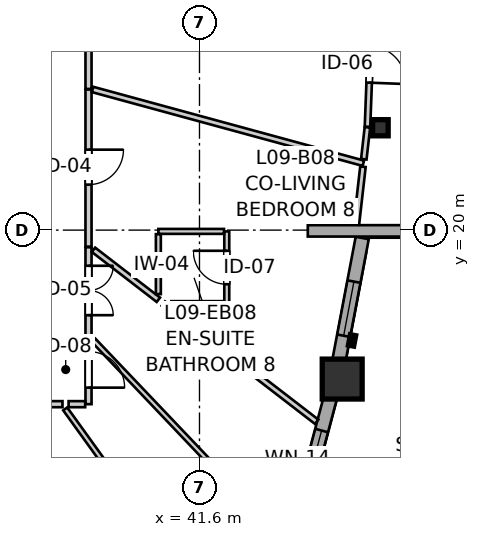
"""IFC4 building model, lengths in metres.
Left out: names, types, materials, properties, quantities, classifications, styles, units other than length and angle.
Written with IfcOpenShell. Run it as: python <this file> out.ifc"""

import sys

from ifc_helpers import new_model, si_unit, direction, frame, frame_2d, origin, origin_2d, place, context, subcontext, project, spatial, rectangle, i_section, extrude, source, transform, mapped, element, fill, save


model = new_model("IFC4")
c1 = context("Model", 3, precision=1e-05, world=origin(), true_north=direction((0.0, 1.0)))
c2 = subcontext(c1, "Body", "Model", "MODEL_VIEW")
j1 = project(units=[si_unit("LENGTHUNIT", "METRE"), si_unit("PLANEANGLEUNIT", "RADIAN")], contexts=[c1])
p1 = place(None, origin())
s1 = spatial("IfcSite", under=j1, at=p1, CompositionType="ELEMENT")
p2 = place(p1, origin())
s2 = spatial("IfcBuilding", under=s1, at=p2, CompositionType="ELEMENT")
p3 = place(p2, frame((0.0, 0.0, 33.4)))
s3 = spatial("IfcBuildingStorey", under=s2, at=p3, CompositionType="ELEMENT", Elevation=33.4)
m1 = source(origin(), c2, "Body", "SweptSolid", [
    extrude(rectangle(XDim=1.05, YDim=1.05, at=origin_2d()), origin(), (0.0, 0.0, 1.0), 2.94),
])
p4 = place(p3, frame((45.355, 16.081, 0.0), z_axis=(0.0, 0.0, 1.0), x_axis=(1.0, 0.0, 0.0)))
e1 = element("IfcColumn", 1, at=p4, inside=s3, PredefinedType="COLUMN", context=c2, shape_type="MappedRepresentation", body=[
    mapped(m1, transform((0.0, 0.0, 0.0), x_axis=(1.0, 0.0, 0.0), y_axis=(0.0, 1.0, 0.0), z_axis=(0.0, 0.0, 1.0), scale=1.0)),
])
m2 = source(origin(), c2, "Body", "SweptSolid", [
    extrude(i_section(OverallWidth=0.409, OverallDepth=0.425, WebThickness=0.03, FlangeThickness=0.048, FilletRadius=0.015, at=origin_2d()), origin(), (0.0, 0.0, 1.0), 2.94),
])
p5 = place(p3, frame((46.361, 22.694, 0.0), z_axis=(0.0, 0.0, 1.0), x_axis=(1.0, 0.0, 0.0)))
e2 = element("IfcColumn", 2, at=p5, inside=s3, PredefinedType="PILASTER", context=c2, shape_type="MappedRepresentation", body=[
    mapped(m2, transform((0.0, 0.0, 0.0), x_axis=(1.0, 0.0, 0.0), y_axis=(0.0, 1.0, 0.0), z_axis=(0.0, 0.0, 1.0), scale=1.0)),
])
p6 = place(p3, frame((44.297, 12.782, 0.0), z_axis=(0.0, 0.0, 1.0), x_axis=(0.257090265476, 0.96638739406, 0.0)))
e3 = element("IfcWall", 3, at=p6, inside=s3, PredefinedType="SOLIDWALL", context=c2, shape_type="SweptSolid", body=[
    extrude(rectangle(XDim=3.159, YDim=0.35, at=frame_2d((1.58, 0.0))), origin(), (0.0, 0.0, 1.0), 2.42),
])
p7 = place(p6, frame((0.261, 0.0, 0.82)))
e4 = element("IfcOpeningElement", 4, at=p7, cuts=e3, PredefinedType="OPENING", context=c2, shape_type="SweptSolid", body=[
    extrude(rectangle(XDim=1.75, YDim=1.3, at=frame_2d((0.875, 0.65))), frame((0.0, 0.185, 0.0), z_axis=(0.0, -1.0, 0.0), x_axis=(1.0, 0.0, 0.0)), (0.0, 0.0, 1.0), 0.37),
])
p8 = place(p3, frame((45.24, 16.408, 0.0), z_axis=(0.0, 0.0, 1.0), x_axis=(0.186636709983, 0.982428999209, 0.0)))
e5 = element("IfcWall", 5, at=p8, inside=s3, PredefinedType="SOLIDWALL", context=c2, shape_type="SweptSolid", body=[
    extrude(rectangle(XDim=3.446, YDim=0.35, at=frame_2d((1.723, 0.0))), origin(), (0.0, 0.0, 1.0), 2.42),
])
p9 = place(p8, frame((0.828, 0.0, 0.82)))
e6 = element("IfcOpeningElement", 6, at=p9, cuts=e5, PredefinedType="OPENING", context=c2, shape_type="SweptSolid", body=[
    extrude(rectangle(XDim=1.45, YDim=1.25, at=frame_2d((0.725, 0.625))), frame((0.0, 0.185, 0.0), z_axis=(0.0, -1.0, 0.0), x_axis=(1.0, 0.0, 0.0)), (0.0, 0.0, 1.0), 0.37),
])
p10 = place(p3, frame((44.45, 19.98, 0.0), z_axis=(0.0, 0.0, 1.0), x_axis=(1.0, 0.0, 0.0)))
e7 = element("IfcWall", 7, at=p10, inside=s3, PredefinedType="SOLIDWALL", context=c2, shape_type="SweptSolid", body=[
    extrude(rectangle(XDim=20.685, YDim=0.3, at=frame_2d((10.342, 0.0))), origin(), (0.0, 0.0, 1.0), 2.12),
])
p11 = place(p3, frame((38.68, 28.445, 0.0), z_axis=(0.0, 0.0, 1.0), x_axis=(0.0, -1.0, 0.0)))
e8 = element("IfcWall", 8, at=p11, inside=s3, PredefinedType="PARTITIONING", context=c2, shape_type="SweptSolid", body=[
    extrude(rectangle(XDim=4.731, YDim=0.16, at=frame_2d((2.365, 0.0))), origin(), (0.0, 0.0, 1.0), 2.94),
])
p12 = place(p11, frame((1.716, 0.0, 0.0)))
e9 = element("IfcOpeningElement", 9, at=p12, cuts=e8, PredefinedType="OPENING", context=c2, shape_type="SweptSolid", body=[
    extrude(rectangle(XDim=1.3, YDim=2.1, at=frame_2d((0.65, 1.05))), frame((0.0, 0.09, 0.0), z_axis=(0.0, -1.0, 0.0), x_axis=(1.0, 0.0, 0.0)), (0.0, 0.0, 1.0), 0.18),
])
p13 = place(p3, frame((38.68, 23.699, 0.0), z_axis=(0.0, 0.0, 1.0), x_axis=(0.0, -1.0, 0.0)))
e10 = element("IfcWall", 10, at=p13, inside=s3, PredefinedType="PARTITIONING", context=c2, shape_type="SweptSolid", body=[
    extrude(rectangle(XDim=4.135, YDim=0.16, at=frame_2d((2.067, 0.0))), origin(), (0.0, 0.0, 1.0), 2.94),
])
p14 = place(p13, frame((1.583, 0.0, 0.0)))
e11 = element("IfcOpeningElement", 11, at=p14, cuts=e10, PredefinedType="OPENING", context=c2, shape_type="SweptSolid", body=[
    extrude(rectangle(XDim=0.92, YDim=2.1, at=frame_2d((0.46, 1.05))), frame((0.0, 0.09, 0.0), z_axis=(0.0, -1.0, 0.0), x_axis=(1.0, 0.0, 0.0)), (0.0, 0.0, 1.0), 0.18),
])
p15 = place(p3, frame((46.146, 25.985, 0.0), z_axis=(0.0, 0.0, 1.0), x_axis=(-0.038094618751, -0.999274136572, 0.0)))
e12 = element("IfcWall", 12, at=p15, inside=s3, PredefinedType="PARTITIONING", context=c2, shape_type="SweptSolid", body=[
    extrude(rectangle(XDim=3.269, YDim=0.145, at=frame_2d((1.634, 0.0))), origin(), (0.0, 0.0, 1.0), 2.408),
])
p16 = place(p15, frame((1.147, 0.0, 0.0)))
e13 = element("IfcOpeningElement", 13, at=p16, cuts=e12, PredefinedType="OPENING", context=c2, shape_type="SweptSolid", body=[
    extrude(rectangle(XDim=0.96, YDim=2.1, at=frame_2d((0.48, 1.05))), frame((0.0, 0.083, 0.0), z_axis=(0.0, -1.0, 0.0), x_axis=(1.0, 0.0, 0.0)), (0.0, 0.0, 1.0), 0.165),
])
p17 = place(p3, frame((37.995, 15.42, 0.0), z_axis=(0.0, 0.0, 1.0), x_axis=(-1.0, 0.0, 0.0)))
e14 = element("IfcWall", 14, at=p17, inside=s3, PredefinedType="PARTITIONING", context=c2, shape_type="SweptSolid", body=[
    extrude(rectangle(XDim=2.9, YDim=0.16, at=frame_2d((1.45, 0.0))), origin(), (0.0, 0.0, 1.0), 2.94),
])
p18 = place(p17, frame((1.014, 0.0, 0.0)))
e15 = element("IfcOpeningElement", 15, at=p18, cuts=e14, PredefinedType="OPENING", context=c2, shape_type="SweptSolid", body=[
    extrude(rectangle(XDim=0.92, YDim=2.1, at=frame_2d((0.46, 1.05))), frame((0.0, 0.09, 0.0), z_axis=(0.0, -1.0, 0.0), x_axis=(1.0, 0.0, 0.0)), (0.0, 0.0, 1.0), 0.18),
])
p19 = place(p3, frame((38.68, 19.549, 0.0), z_axis=(0.0, 0.0, 1.0), x_axis=(0.0, -1.0, 0.0)))
e16 = element("IfcWall", 16, at=p19, inside=s3, PredefinedType="PARTITIONING", context=c2, shape_type="SweptSolid", body=[
    extrude(rectangle(XDim=2.331, YDim=0.16, at=frame_2d((1.166, 0.0))), origin(), (0.0, 0.0, 1.0), 2.94),
])
p20 = place(p19, frame((0.488, 0.0, 0.0)))
e17 = element("IfcOpeningElement", 17, at=p20, cuts=e16, PredefinedType="OPENING", context=c2, shape_type="SweptSolid", body=[
    extrude(rectangle(XDim=1.3, YDim=2.1, at=frame_2d((0.65, 1.05))), frame((0.0, 0.09, 0.0), z_axis=(0.0, -1.0, 0.0), x_axis=(1.0, 0.0, 0.0)), (0.0, 0.0, 1.0), 0.18),
])
p21 = place(p3, frame((42.318, 18.066, 0.0), z_axis=(0.0, 0.0, 1.0), x_axis=(0.0, 1.0, 0.0)))
e18 = element("IfcWall", 18, at=p21, inside=s3, PredefinedType="PARTITIONING", context=c2, shape_type="SweptSolid", body=[
    extrude(rectangle(XDim=1.9, YDim=0.13, at=frame_2d((0.95, 0.0))), origin(), (0.0, 0.0, 1.0), 2.94),
])
p22 = place(p21, frame((0.51, 0.0, 0.0)))
e19 = element("IfcOpeningElement", 19, at=p22, cuts=e18, PredefinedType="OPENING", context=c2, shape_type="SweptSolid", body=[
    extrude(rectangle(XDim=0.88, YDim=2.05, at=frame_2d((0.44, 1.025))), frame((0.0, 0.075, 0.0), z_axis=(0.0, -1.0, 0.0), x_axis=(1.0, 0.0, 0.0)), (0.0, 0.0, 1.0), 0.15),
])
p23 = place(p3, frame((38.68, 17.203, 0.0), z_axis=(0.0, 0.0, 1.0), x_axis=(0.0, -1.0, 0.0)))
e20 = element("IfcWall", 20, at=p23, inside=s3, PredefinedType="PARTITIONING", context=c2, shape_type="SweptSolid", body=[
    extrude(rectangle(XDim=1.783, YDim=0.16, at=frame_2d((0.892, 0.0))), origin(), (0.0, 0.0, 1.0), 2.94),
])
p24 = place(p23, frame((0.398, 0.0, 0.0)))
e21 = element("IfcOpeningElement", 21, at=p24, cuts=e20, PredefinedType="OPENING", context=c2, shape_type="SweptSolid", body=[
    extrude(rectangle(XDim=0.95, YDim=2.1, at=frame_2d((0.475, 1.05))), frame((0.0, 0.09, 0.0), z_axis=(0.0, -1.0, 0.0), x_axis=(1.0, 0.0, 0.0)), (0.0, 0.0, 1.0), 0.18),
])
p25 = place(p3, frame((38.067, 15.295, 0.0), z_axis=(0.0, 0.0, 1.0), x_axis=(0.584777320582, -0.811193864211, 0.0)))
e22 = element("IfcWall", 22, at=p25, inside=s3, PredefinedType="PARTITIONING", context=c2, shape_type="SweptSolid", body=[
    extrude(rectangle(XDim=8.164, YDim=0.13, at=frame_2d((4.082, 0.0))), origin(), (0.0, 0.0, 1.0), 2.94),
])
p26 = place(p3, frame((38.787, 23.701, 0.0), z_axis=(0.0, 0.0, 1.0), x_axis=(0.964810342249, -0.262946769308, 0.0)))
e23 = element("IfcWall", 23, at=p26, inside=s3, PredefinedType="PARTITIONING", context=c2, shape_type="SweptSolid", body=[
    extrude(rectangle(XDim=7.385, YDim=0.145, at=frame_2d((3.692, 0.0))), origin(), (0.0, 0.0, 1.0), 2.94),
])
p27 = place(p3, frame((38.812, 17.101, 0.0), z_axis=(0.0, 0.0, 1.0), x_axis=(0.689140556814, -0.724627692649, 0.0)))
e24 = element("IfcWall", 24, at=p27, inside=s3, PredefinedType="PARTITIONING", context=c2, shape_type="SweptSolid", body=[
    extrude(rectangle(XDim=7.217, YDim=0.13, at=frame_2d((3.608, 0.0))), origin(), (0.0, 0.0, 1.0), 2.94),
])
p28 = place(p3, frame((40.649, 18.066, 0.0), z_axis=(0.0, 0.0, 1.0), x_axis=(0.792155051101, -0.610319895641, 0.0)))
e25 = element("IfcWall", 25, at=p28, inside=s3, PredefinedType="PARTITIONING", context=c2, shape_type="SweptSolid", body=[
    extrude(rectangle(XDim=5.093, YDim=0.145, at=frame_2d((2.546, 0.0))), origin(), (0.0, 0.0, 1.0), 2.94),
])
p29 = place(p3, frame((38.811, 19.482, 0.0), z_axis=(0.0, 0.0, 1.0), x_axis=(0.792185877025, -0.61027988353, 0.0)))
e26 = element("IfcWall", 26, at=p29, inside=s3, PredefinedType="PARTITIONING", context=c2, shape_type="SweptSolid", body=[
    extrude(rectangle(XDim=2.156, YDim=0.145, at=frame_2d((1.078, 0.0))), origin(), (0.0, 0.0, 1.0), 2.94),
])
p30 = place(p3, frame((40.518, 19.966, 0.0), z_axis=(0.0, 0.0, 1.0), x_axis=(1.0, 0.0, 0.0)))
e27 = element("IfcWall", 27, at=p30, inside=s3, PredefinedType="PARTITIONING", context=c2, shape_type="SweptSolid", body=[
    extrude(rectangle(XDim=1.727, YDim=0.13, at=frame_2d((0.864, 0.0))), origin(), (0.0, 0.0, 1.0), 2.108),
])
p31 = place(p3, frame((40.518, 18.317, 0.0), z_axis=(0.0, 0.0, 1.0), x_axis=(0.0, 1.0, 0.0)))
e28 = element("IfcWall", 28, at=p31, inside=s3, PredefinedType="PARTITIONING", context=c2, shape_type="SweptSolid", body=[
    extrude(rectangle(XDim=1.576, YDim=0.13, at=frame_2d((0.788, 0.0))), origin(), (0.0, 0.0, 1.0), 2.94),
])
p32 = place(p3, frame((40.86, 18.066, 0.0), z_axis=(0.0, 0.0, 1.0), x_axis=(1.0, 0.0, 0.0)))
e29 = element("IfcWall", 29, at=p32, inside=s3, PredefinedType="PARTITIONING", context=c2, shape_type="SweptSolid", body=[
    extrude(rectangle(XDim=1.385, YDim=0.13, at=frame_2d((0.692, 0.0))), origin(), (0.0, 0.0, 1.0), 2.94),
])
p33 = place(p3, frame((45.729, 20.146, 0.0), z_axis=(0.0, 0.0, 1.0), x_axis=(0.113074294354, 0.993586535716, 0.0)))
e30 = element("IfcWall", 30, at=p33, inside=s3, PredefinedType="PARTITIONING", context=c2, shape_type="SweptSolid", body=[
    extrude(rectangle(XDim=1.531, YDim=0.145, at=frame_2d((0.765, 0.0))), origin(), (0.0, 0.0, 1.0), 2.408),
])
p34 = place(p3, frame((45.924, 21.866, 0.0), z_axis=(0.0, 0.0, 1.0), x_axis=(0.112844765803, 0.993612630169, 0.0)))
e31 = element("IfcWall", 31, at=p34, inside=s3, PredefinedType="PARTITIONING", context=c2, shape_type="SweptSolid", body=[
    extrude(rectangle(XDim=0.844, YDim=0.145, at=frame_2d((0.422, 0.0))), origin(), (0.0, 0.0, 1.0), 2.408),
])
p35 = place(p3, frame((38.156, 15.42, 0.0), z_axis=(0.0, 0.0, 1.0), x_axis=(1.0, 0.0, 0.0)))
e32 = element("IfcWall", 32, at=p35, inside=s3, PredefinedType="PARTITIONING", context=c2, shape_type="SweptSolid", body=[
    extrude(rectangle(XDim=0.436, YDim=0.16, at=frame_2d((0.218, 0.0))), origin(), (0.0, 0.0, 1.0), 2.94),
])
m3 = source(origin(), c2, "Body", "SweptSolid", [
    extrude(rectangle(XDim=1.75, YDim=1.3, at=frame_2d((0.875, 0.65))), frame((0.0, 0.03, 0.0), z_axis=(0.0, -1.0, 0.0), x_axis=(1.0, 0.0, 0.0)), (0.0, 0.0, 1.0), 0.06),
])
p36 = place(p7, origin())
e33 = element("IfcWindow", 33, at=p36, inside=s3, PartitioningType="SINGLE_PANEL", PredefinedType="WINDOW", context=c2, shape_type="MappedRepresentation", body=[
    mapped(m3, transform((0.0, 0.0, 0.0), x_axis=(1.0, 0.0, 0.0), y_axis=(0.0, 1.0, 0.0), z_axis=(0.0, 0.0, 1.0), scale=1.0)),
])
fill(e4, e33)
m4 = source(origin(), c2, "Body", "SweptSolid", [
    extrude(rectangle(XDim=1.45, YDim=1.25, at=frame_2d((0.725, 0.625))), frame((0.0, 0.03, 0.0), z_axis=(0.0, -1.0, 0.0), x_axis=(1.0, 0.0, 0.0)), (0.0, 0.0, 1.0), 0.06),
])
p37 = place(p9, origin())
e34 = element("IfcWindow", 34, at=p37, inside=s3, PartitioningType="SINGLE_PANEL", PredefinedType="WINDOW", context=c2, shape_type="MappedRepresentation", body=[
    mapped(m4, transform((0.0, 0.0, 0.0), x_axis=(1.0, 0.0, 0.0), y_axis=(0.0, 1.0, 0.0), z_axis=(0.0, 0.0, 1.0), scale=1.0)),
])
fill(e6, e34)
m5 = source(origin(), c2, "Body", "SweptSolid", [
    extrude(rectangle(XDim=0.92, YDim=2.1, at=frame_2d((0.46, 1.05))), frame((0.0, 0.025, 0.0), z_axis=(0.0, -1.0, 0.0), x_axis=(1.0, 0.0, 0.0)), (0.0, 0.0, 1.0), 0.05),
])
p38 = place(p14, origin())
e35 = element("IfcDoor", 35, at=p38, inside=s3, OperationType="SINGLE_SWING_LEFT", PredefinedType="DOOR", context=c2, shape_type="MappedRepresentation", body=[
    mapped(m5, transform((0.0, 0.0, 0.0), x_axis=(1.0, 0.0, 0.0), y_axis=(0.0, 1.0, 0.0), z_axis=(0.0, 0.0, 1.0), scale=1.0)),
])
fill(e11, e35)
m6 = source(origin(), c2, "Body", "SweptSolid", [
    extrude(rectangle(XDim=0.96, YDim=2.1, at=frame_2d((0.48, 1.05))), frame((0.0, 0.025, 0.0), z_axis=(0.0, -1.0, 0.0), x_axis=(1.0, 0.0, 0.0)), (0.0, 0.0, 1.0), 0.05),
])
p39 = place(p16, origin())
e36 = element("IfcDoor", 36, at=p39, inside=s3, OperationType="SINGLE_SWING_RIGHT", PredefinedType="DOOR", context=c2, shape_type="MappedRepresentation", body=[
    mapped(m6, transform((0.0, 0.0, 0.0), x_axis=(1.0, 0.0, 0.0), y_axis=(0.0, 1.0, 0.0), z_axis=(0.0, 0.0, 1.0), scale=1.0)),
])
fill(e13, e36)
m7 = source(origin(), c2, "Body", "SweptSolid", [
    extrude(rectangle(XDim=1.3, YDim=2.1, at=frame_2d((0.65, 1.05))), frame((0.0, 0.025, 0.0), z_axis=(0.0, -1.0, 0.0), x_axis=(1.0, 0.0, 0.0)), (0.0, 0.0, 1.0), 0.05),
])
p40 = place(p20, origin())
e37 = element("IfcDoor", 37, at=p40, inside=s3, OperationType="DOUBLE_DOOR_SINGLE_SWING", PredefinedType="DOOR", context=c2, shape_type="MappedRepresentation", body=[
    mapped(m7, transform((0.0, 0.0, 0.0), x_axis=(1.0, 0.0, 0.0), y_axis=(0.0, 1.0, 0.0), z_axis=(0.0, 0.0, 1.0), scale=1.0)),
])
fill(e17, e37)
m8 = source(origin(), c2, "Body", "SweptSolid", [
    extrude(rectangle(XDim=0.88, YDim=2.05, at=frame_2d((0.44, 1.025))), frame((0.0, 0.025, 0.0), z_axis=(0.0, -1.0, 0.0), x_axis=(1.0, 0.0, 0.0)), (0.0, 0.0, 1.0), 0.05),
])
p41 = place(p22, origin())
e38 = element("IfcDoor", 38, at=p41, inside=s3, OperationType="SINGLE_SWING_RIGHT", PredefinedType="DOOR", context=c2, shape_type="MappedRepresentation", body=[
    mapped(m8, transform((0.0, 0.0, 0.0), x_axis=(1.0, 0.0, 0.0), y_axis=(0.0, 1.0, 0.0), z_axis=(0.0, 0.0, 1.0), scale=1.0)),
])
fill(e19, e38)
m9 = source(origin(), c2, "Body", "SweptSolid", [
    extrude(rectangle(XDim=0.95, YDim=2.1, at=frame_2d((0.475, 1.05))), frame((0.0, 0.025, 0.0), z_axis=(0.0, -1.0, 0.0), x_axis=(1.0, 0.0, 0.0)), (0.0, 0.0, 1.0), 0.05),
])
p42 = place(p24, origin())
e39 = element("IfcDoor", 39, at=p42, inside=s3, OperationType="SINGLE_SWING_RIGHT", PredefinedType="DOOR", context=c2, shape_type="MappedRepresentation", body=[
    mapped(m9, transform((0.0, 0.0, 0.0), x_axis=(1.0, 0.0, 0.0), y_axis=(0.0, 1.0, 0.0), z_axis=(0.0, 0.0, 1.0), scale=1.0)),
])
fill(e21, e39)
save(model, sys.argv[1])
